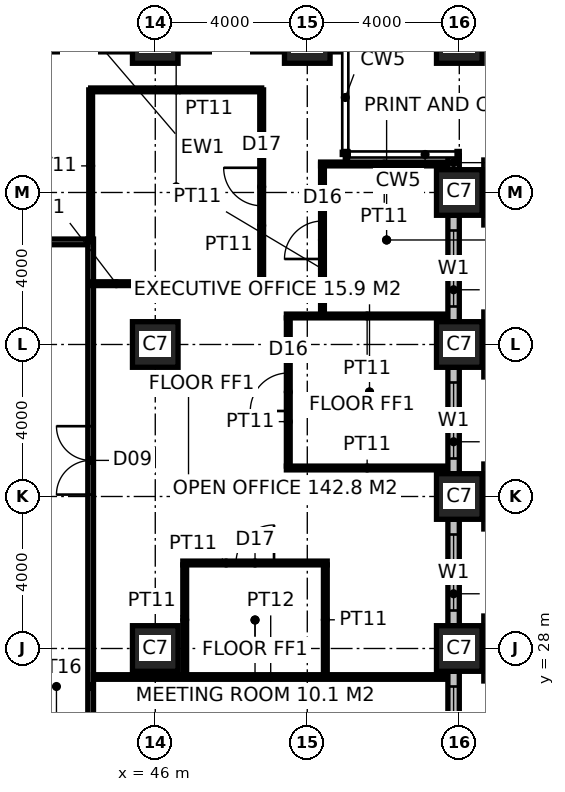
"""IFC4 building model, lengths in metres.
Left out: names, types, materials, properties, quantities, classifications, styles, units other than length and angle.
Written with IfcOpenShell. Run it as: python <this file> out.ifc"""

import sys

from ifc_helpers import new_model, si_unit, direction, frame, frame_2d, origin, origin_2d, place, context, subcontext, project, spatial, rectangle, hollow_rectangle, extrude, element, fill, save


model = new_model("IFC4")
c1 = context("Model", 3, precision=1e-05, world=origin(), true_north=direction((0.0, 1.0)))
c2 = subcontext(c1, "Body", "Model", "MODEL_VIEW")
j1 = project(units=[si_unit("LENGTHUNIT", "METRE"), si_unit("PLANEANGLEUNIT", "RADIAN")], contexts=[c1])
p1 = place(None, origin())
s1 = spatial("IfcSite", under=j1, at=p1, CompositionType="ELEMENT")
p2 = place(p1, origin())
s2 = spatial("IfcBuilding", under=s1, at=p2, CompositionType="ELEMENT")
p3 = place(p2, frame((0.0, 0.0, 15.0)))
s3 = spatial("IfcBuildingStorey", under=s2, at=p3, CompositionType="ELEMENT", Elevation=15.0)
for number, where, z_axis, x_axis in (
    (1, (46.0, 44.0, 0.0), (0.0, 0.0, 1.0), (1.0, 0.0, 0.0)),
    (2, (50.0, 44.0, 0.0), (0.0, 0.0, 1.0), (1.0, 0.0, 0.0)),
    (3, (54.0, 28.0, 0.0), (0.0, 0.0, 1.0), (1.0, 0.0, 0.0)),
    (4, (54.0, 32.0, 0.0), (0.0, 0.0, 1.0), (1.0, 0.0, 0.0)),
    (5, (54.0, 36.0, 0.0), (0.0, 0.0, 1.0), (1.0, 0.0, 0.0)),
    (6, (54.0, 40.0, 0.0), (0.0, 0.0, 1.0), (1.0, 0.0, 0.0)),
    (7, (54.0, 44.0, 0.0), (0.0, 0.0, 1.0), (1.0, 0.0, 0.0)),
    (8, (46.0, 28.0, 0.0), (0.0, 0.0, 1.0), (1.0, 0.0, 0.0)),
    (9, (46.0, 36.0, 0.0), (0.0, 0.0, 1.0), (1.0, 0.0, 0.0)),
):
    element("IfcColumn", number, at=place(p3, frame(where, z_axis=z_axis, x_axis=x_axis)), inside=s3, PredefinedType="COLUMN", context=c2, shape_type="SweptSolid", body=[
        extrude(hollow_rectangle(XDim=1.2, YDim=1.2, WallThickness=0.1, at=origin_2d()), origin(), (0.0, 0.0, 1.0), 4.0),
    ])
p4 = place(p3, frame((44.3, 15.225, 0.0), z_axis=(0.0, 0.0, 1.0), x_axis=(0.0, 1.0, 0.0)))
e10 = element("IfcWall", 10, at=p4, inside=s3, PredefinedType="PARTITIONING", context=c2, shape_type="SweptSolid", body=[
    extrude(rectangle(XDim=23.55, YDim=0.15, at=frame_2d((11.775, 0.0))), origin(), (0.0, 0.0, 1.0), 3.85),
])
p5 = place(p4, frame((5.575, 0.0, 0.0)))
e11 = element("IfcOpeningElement", 11, at=p5, cuts=e10, PredefinedType="OPENING", context=c2, shape_type="SweptSolid", body=[
    extrude(rectangle(XDim=1.8, YDim=2.4, at=frame_2d((0.9, 1.2))), frame((0.0, 0.085, 0.0), z_axis=(0.0, -1.0, 0.0), x_axis=(1.0, 0.0, 0.0)), (0.0, 0.0, 1.0), 0.17),
])
p6 = place(p4, frame((16.825, 0.0, 0.0)))
e12 = element("IfcOpeningElement", 12, at=p6, cuts=e10, PredefinedType="OPENING", context=c2, shape_type="SweptSolid", body=[
    extrude(rectangle(XDim=1.8, YDim=2.4, at=frame_2d((0.9, 1.2))), frame((0.0, 0.085, 0.0), z_axis=(0.0, -1.0, 0.0), x_axis=(1.0, 0.0, 0.0)), (0.0, 0.0, 1.0), 0.17),
])
p7 = place(p3, frame((15.775, 38.7, 0.0), z_axis=(0.0, 0.0, 1.0), x_axis=(1.0, 0.0, 0.0)))
e13 = element("IfcWall", 13, at=p7, inside=s3, PredefinedType="PARTITIONING", context=c2, shape_type="SweptSolid", body=[
    extrude(rectangle(XDim=28.45, YDim=0.15, at=frame_2d((14.225, 0.0))), origin(), (0.0, 0.0, 1.0), 3.85),
])
p8 = place(p7, frame((7.975, 0.0, 0.0)))
e14 = element("IfcOpeningElement", 14, at=p8, cuts=e13, PredefinedType="OPENING", context=c2, shape_type="SweptSolid", body=[
    extrude(rectangle(XDim=0.9, YDim=2.1, at=frame_2d((0.45, 1.05))), frame((0.0, 0.085, 0.0), z_axis=(0.0, -1.0, 0.0), x_axis=(1.0, 0.0, 0.0)), (0.0, 0.0, 1.0), 0.17),
])
p9 = place(p7, frame((11.725, 0.0, 0.0)))
e15 = element("IfcOpeningElement", 15, at=p9, cuts=e13, PredefinedType="OPENING", context=c2, shape_type="SweptSolid", body=[
    extrude(rectangle(XDim=1.0, YDim=2.1, at=frame_2d((0.5, 1.05))), frame((0.0, 0.085, 0.0), z_axis=(0.0, -1.0, 0.0), x_axis=(1.0, 0.0, 0.0)), (0.0, 0.0, 1.0), 0.17),
])
p10 = place(p7, frame((15.575, 0.0, 0.0)))
e16 = element("IfcOpeningElement", 16, at=p10, cuts=e13, PredefinedType="OPENING", context=c2, shape_type="SweptSolid", body=[
    extrude(rectangle(XDim=0.9, YDim=2.1, at=frame_2d((0.45, 1.05))), frame((0.0, 0.085, 0.0), z_axis=(0.0, -1.0, 0.0), x_axis=(1.0, 0.0, 0.0)), (0.0, 0.0, 1.0), 0.17),
])
p11 = place(p3, frame((44.375, 27.25, 0.0), z_axis=(0.0, 0.0, 1.0), x_axis=(1.0, 0.0, 0.0)))
e17 = element("IfcWall", 17, at=p11, inside=s3, PredefinedType="PARTITIONING", context=c2, shape_type="SweptSolid", body=[
    extrude(rectangle(XDim=9.325, YDim=0.12, at=frame_2d((4.663, 0.0))), origin(), (0.0, 0.0, 1.0), 3.85),
])
p12 = place(p3, frame((46.725, 30.25, 0.0), z_axis=(0.0, 0.0, 1.0), x_axis=(1.0, 0.0, 0.0)))
e18 = element("IfcWall", 18, at=p12, inside=s3, PredefinedType="PARTITIONING", context=c2, shape_type="SweptSolid", body=[
    extrude(rectangle(XDim=3.8, YDim=0.1, at=frame_2d((1.9, 0.0))), origin(), (0.0, 0.0, 1.0), 3.85),
])
p13 = place(p12, frame((1.4, 0.0, 0.0)))
e19 = element("IfcOpeningElement", 19, at=p13, cuts=e18, PredefinedType="OPENING", context=c2, shape_type="SweptSolid", body=[
    extrude(rectangle(XDim=1.0, YDim=2.2, at=frame_2d((0.5, 1.1))), frame((0.0, 0.06, 0.0), z_axis=(0.0, -1.0, 0.0), x_axis=(1.0, 0.0, 0.0)), (0.0, 0.0, 1.0), 0.12),
])
for number, where, z_axis, x_axis in (
    (20, (49.45, 32.75, 0.0), (0.0, 0.0, 1.0), (1.0, 0.0, 0.0)),
    (21, (49.45, 36.75, 0.0), (0.0, 0.0, 1.0), (1.0, 0.0, 0.0)),
):
    element("IfcWall", number, at=place(p3, frame(where, z_axis=z_axis, x_axis=x_axis)), inside=s3, PredefinedType="PARTITIONING", context=c2, shape_type="SweptSolid", body=[
        extrude(rectangle(XDim=4.25, YDim=0.1, at=frame_2d((2.125, 0.0))), origin(), (0.0, 0.0, 1.0), 3.85),
    ])
p14 = place(p3, frame((50.35, 40.75, 0.0), z_axis=(0.0, 0.0, 1.0), x_axis=(1.0, 0.0, 0.0)))
e22 = element("IfcWall", 22, at=p14, inside=s3, PredefinedType="PARTITIONING", context=c2, shape_type="SweptSolid", body=[
    extrude(rectangle(XDim=3.35, YDim=0.1, at=frame_2d((1.675, 0.0))), origin(), (0.0, 0.0, 1.0), 3.85),
])
p15 = place(p3, frame((46.775, 27.31, 0.0), z_axis=(0.0, 0.0, 1.0), x_axis=(0.0, 1.0, 0.0)))
e23 = element("IfcWall", 23, at=p15, inside=s3, PredefinedType="PARTITIONING", context=c2, shape_type="SweptSolid", body=[
    extrude(rectangle(XDim=2.89, YDim=0.1, at=frame_2d((1.445, 0.0))), origin(), (0.0, 0.0, 1.0), 3.85),
])
p16 = place(p3, frame((49.5, 32.8, 0.0), z_axis=(0.0, 0.0, 1.0), x_axis=(0.0, 1.0, 0.0)))
e24 = element("IfcWall", 24, at=p16, inside=s3, PredefinedType="PARTITIONING", context=c2, shape_type="SweptSolid", body=[
    extrude(rectangle(XDim=3.9, YDim=0.1, at=frame_2d((1.95, 0.0))), origin(), (0.0, 0.0, 1.0), 3.85),
])
p17 = place(p16, frame((1.45, 0.0, 0.0)))
e25 = element("IfcOpeningElement", 25, at=p17, cuts=e24, PredefinedType="OPENING", context=c2, shape_type="SweptSolid", body=[
    extrude(rectangle(XDim=1.0, YDim=2.2, at=frame_2d((0.5, 1.1))), frame((0.0, 0.06, 0.0), z_axis=(0.0, -1.0, 0.0), x_axis=(1.0, 0.0, 0.0)), (0.0, 0.0, 1.0), 0.12),
])
p18 = place(p3, frame((50.4, 36.8, 0.0), z_axis=(0.0, 0.0, 1.0), x_axis=(0.0, 1.0, 0.0)))
e26 = element("IfcWall", 26, at=p18, inside=s3, PredefinedType="PARTITIONING", context=c2, shape_type="SweptSolid", body=[
    extrude(rectangle(XDim=3.95, YDim=0.1, at=frame_2d((1.975, 0.0))), origin(), (0.0, 0.0, 1.0), 2.95),
])
p19 = place(p18, frame((1.45, 0.0, 0.0)))
e27 = element("IfcOpeningElement", 27, at=p19, cuts=e26, PredefinedType="OPENING", context=c2, shape_type="SweptSolid", body=[
    extrude(rectangle(XDim=1.0, YDim=2.2, at=frame_2d((0.5, 1.1))), frame((0.0, 0.06, 0.0), z_axis=(0.0, -1.0, 0.0), x_axis=(1.0, 0.0, 0.0)), (0.0, 0.0, 1.0), 0.12),
])
p20 = place(p3, frame((50.475, 27.31, 0.0), z_axis=(0.0, 0.0, 1.0), x_axis=(0.0, 1.0, 0.0)))
e28 = element("IfcWall", 28, at=p20, inside=s3, PredefinedType="PARTITIONING", context=c2, shape_type="SweptSolid", body=[
    extrude(rectangle(XDim=2.89, YDim=0.1, at=frame_2d((1.445, 0.0))), origin(), (0.0, 0.0, 1.0), 3.85),
])
p21 = place(p3, frame((44.3, 37.6, 0.0), z_axis=(0.0, 0.0, 1.0), x_axis=(1.0, 0.0, 0.0)))
e29 = element("IfcWall", 29, at=p21, inside=s3, PredefinedType="PARTITIONING", context=c2, shape_type="SweptSolid", body=[
    extrude(rectangle(XDim=4.5, YDim=0.1, at=frame_2d((2.25, 0.0))), origin(), (0.0, 0.0, 1.0), 3.85),
])
p22 = place(p3, frame((48.8, 37.6, 0.0), z_axis=(0.0, 0.0, 1.0), x_axis=(0.0, 1.0, 0.0)))
e30 = element("IfcWall", 30, at=p22, inside=s3, PredefinedType="PARTITIONING", context=c2, shape_type="SweptSolid", body=[
    extrude(rectangle(XDim=5.1, YDim=0.1, at=frame_2d((2.55, 0.0))), origin(), (0.0, 0.0, 1.0), 3.85),
])
p23 = place(p22, frame((2.05, 0.0, 0.0)))
e31 = element("IfcOpeningElement", 31, at=p23, cuts=e30, PredefinedType="OPENING", context=c2, shape_type="SweptSolid", body=[
    extrude(rectangle(XDim=1.0, YDim=2.2, at=frame_2d((0.5, 1.1))), frame((0.0, 0.06, 0.0), z_axis=(0.0, -1.0, 0.0), x_axis=(1.0, 0.0, 0.0)), (0.0, 0.0, 1.0), 0.12),
])
p24 = place(p3, frame((48.8, 42.7, 0.0), z_axis=(0.0, 0.0, 1.0), x_axis=(-1.0, 0.0, 0.0)))
e32 = element("IfcWall", 32, at=p24, inside=s3, PredefinedType="PARTITIONING", context=c2, shape_type="SweptSolid", body=[
    extrude(rectangle(XDim=4.5, YDim=0.1, at=frame_2d((2.25, 0.0))), origin(), (0.0, 0.0, 1.0), 3.85),
])
p25 = place(p3, frame((44.3, 42.7, 0.0), z_axis=(0.0, 0.0, 1.0), x_axis=(0.0, -1.0, 0.0)))
e33 = element("IfcWall", 33, at=p25, inside=s3, PredefinedType="PARTITIONING", context=c2, shape_type="SweptSolid", body=[
    extrude(rectangle(XDim=4.0, YDim=0.1, at=frame_2d((2.0, 0.0))), origin(), (0.0, 0.0, 1.0), 3.85),
])
p26 = place(p3, frame((53.85, 24.6, 0.0), z_axis=(0.0, 0.0, 1.0), x_axis=(0.0, 1.0, 0.0)))
e34 = element("IfcWall", 34, at=p26, inside=s3, PredefinedType="ELEMENTEDWALL", context=c2, shape_type="SweptSolid", body=[
    extrude(rectangle(XDim=2.8, YDim=0.3, at=frame_2d((1.4, 0.0))), origin(), (0.0, 0.0, 1.0), 2.85),
])
p27 = place(p26, frame((0.4, 0.0, 0.8)))
e35 = element("IfcOpeningElement", 35, at=p27, cuts=e34, PredefinedType="OPENING", context=c2, shape_type="SweptSolid", body=[
    extrude(rectangle(XDim=2.0, YDim=2.0, at=frame_2d((1.0, 1.0))), frame((0.0, 0.16, 0.0), z_axis=(0.0, -1.0, 0.0), x_axis=(1.0, 0.0, 0.0)), (0.0, 0.0, 1.0), 0.32),
])
p28 = place(p3, frame((53.85, 28.6, 0.0), z_axis=(0.0, 0.0, 1.0), x_axis=(0.0, 1.0, 0.0)))
e36 = element("IfcWall", 36, at=p28, inside=s3, PredefinedType="ELEMENTEDWALL", context=c2, shape_type="SweptSolid", body=[
    extrude(rectangle(XDim=2.8, YDim=0.3, at=frame_2d((1.4, 0.0))), origin(), (0.0, 0.0, 1.0), 2.85),
])
p29 = place(p28, frame((0.4, 0.0, 0.8)))
e37 = element("IfcOpeningElement", 37, at=p29, cuts=e36, PredefinedType="OPENING", context=c2, shape_type="SweptSolid", body=[
    extrude(rectangle(XDim=2.0, YDim=2.0, at=frame_2d((1.0, 1.0))), frame((0.0, 0.16, 0.0), z_axis=(0.0, -1.0, 0.0), x_axis=(1.0, 0.0, 0.0)), (0.0, 0.0, 1.0), 0.32),
])
p30 = place(p3, frame((53.85, 32.6, 0.0), z_axis=(0.0, 0.0, 1.0), x_axis=(0.0, 1.0, 0.0)))
e38 = element("IfcWall", 38, at=p30, inside=s3, PredefinedType="ELEMENTEDWALL", context=c2, shape_type="SweptSolid", body=[
    extrude(rectangle(XDim=2.8, YDim=0.3, at=frame_2d((1.4, 0.0))), origin(), (0.0, 0.0, 1.0), 2.85),
])
p31 = place(p30, frame((0.4, 0.0, 0.8)))
e39 = element("IfcOpeningElement", 39, at=p31, cuts=e38, PredefinedType="OPENING", context=c2, shape_type="SweptSolid", body=[
    extrude(rectangle(XDim=2.0, YDim=2.0, at=frame_2d((1.0, 1.0))), frame((0.0, 0.16, 0.0), z_axis=(0.0, -1.0, 0.0), x_axis=(1.0, 0.0, 0.0)), (0.0, 0.0, 1.0), 0.32),
])
p32 = place(p3, frame((53.85, 36.6, 0.0), z_axis=(0.0, 0.0, 1.0), x_axis=(0.0, 1.0, 0.0)))
e40 = element("IfcWall", 40, at=p32, inside=s3, PredefinedType="ELEMENTEDWALL", context=c2, shape_type="SweptSolid", body=[
    extrude(rectangle(XDim=2.8, YDim=0.3, at=frame_2d((1.4, 0.0))), origin(), (0.0, 0.0, 1.0), 2.85),
])
p33 = place(p32, frame((0.4, 0.0, 0.8)))
e41 = element("IfcOpeningElement", 41, at=p33, cuts=e40, PredefinedType="OPENING", context=c2, shape_type="SweptSolid", body=[
    extrude(rectangle(XDim=2.0, YDim=2.0, at=frame_2d((1.0, 1.0))), frame((0.0, 0.16, 0.0), z_axis=(0.0, -1.0, 0.0), x_axis=(1.0, 0.0, 0.0)), (0.0, 0.0, 1.0), 0.32),
])
p34 = place(p3, frame((53.85, 40.6, 0.0), z_axis=(0.0, 0.0, 1.0), x_axis=(0.0, 1.0, 0.0)))
e42 = element("IfcWall", 42, at=p34, inside=s3, PredefinedType="ELEMENTEDWALL", context=c2, shape_type="SweptSolid", body=[
    extrude(rectangle(XDim=0.37, YDim=0.3, at=frame_2d((0.185, 0.0))), origin(), (0.0, 0.0, 1.0), 2.95),
])
p35 = place(p6, origin())
e43 = element("IfcDoor", 43, at=p35, inside=s3, OperationType="DOUBLE_DOOR_DOUBLE_SWING", PredefinedType="DOOR", context=c2, shape_type="SweptSolid", body=[
    extrude(rectangle(XDim=1.8, YDim=2.4, at=frame_2d((0.9, 1.2))), frame((0.0, 0.025, 0.0), z_axis=(0.0, -1.0, 0.0), x_axis=(1.0, 0.0, 0.0)), (0.0, 0.0, 1.0), 0.05),
])
fill(e12, e43)
p36 = place(p17, origin())
e44 = element("IfcDoor", 44, at=p36, inside=s3, OperationType="SINGLE_SWING_LEFT", PredefinedType="DOOR", context=c2, shape_type="SweptSolid", body=[
    extrude(rectangle(XDim=1.0, YDim=2.2, at=frame_2d((0.5, 1.1))), frame((0.0, 0.025, 0.0), z_axis=(0.0, -1.0, 0.0), x_axis=(1.0, 0.0, 0.0)), (0.0, 0.0, 1.0), 0.05),
])
fill(e25, e44)
p37 = place(p19, origin())
e45 = element("IfcDoor", 45, at=p37, inside=s3, OperationType="SINGLE_SWING_LEFT", PredefinedType="DOOR", context=c2, shape_type="SweptSolid", body=[
    extrude(rectangle(XDim=1.0, YDim=2.2, at=frame_2d((0.5, 1.1))), frame((0.0, 0.025, 0.0), z_axis=(0.0, -1.0, 0.0), x_axis=(1.0, 0.0, 0.0)), (0.0, 0.0, 1.0), 0.05),
])
fill(e27, e45)
p38 = place(p13, origin())
e46 = element("IfcDoor", 46, at=p38, inside=s3, OperationType="SINGLE_SWING_RIGHT", PredefinedType="DOOR", context=c2, shape_type="SweptSolid", body=[
    extrude(rectangle(XDim=1.0, YDim=2.2, at=frame_2d((0.5, 1.1))), frame((0.0, 0.025, 0.0), z_axis=(0.0, -1.0, 0.0), x_axis=(1.0, 0.0, 0.0)), (0.0, 0.0, 1.0), 0.05),
])
fill(e19, e46)
p39 = place(p23, origin())
e47 = element("IfcDoor", 47, at=p39, inside=s3, OperationType="SINGLE_SWING_RIGHT", PredefinedType="DOOR", context=c2, shape_type="SweptSolid", body=[
    extrude(rectangle(XDim=1.0, YDim=2.2, at=frame_2d((0.5, 1.1))), frame((0.0, 0.025, 0.0), z_axis=(0.0, -1.0, 0.0), x_axis=(1.0, 0.0, 0.0)), (0.0, 0.0, 1.0), 0.05),
])
fill(e31, e47)
p40 = place(p27, origin())
e48 = element("IfcWindow", 48, at=p40, inside=s3, PartitioningType="SINGLE_PANEL", PredefinedType="WINDOW", context=c2, shape_type="SweptSolid", body=[
    extrude(rectangle(XDim=2.0, YDim=2.0, at=frame_2d((1.0, 1.0))), frame((0.0, 0.03, 0.0), z_axis=(0.0, -1.0, 0.0), x_axis=(1.0, 0.0, 0.0)), (0.0, 0.0, 1.0), 0.06),
])
fill(e35, e48)
p41 = place(p29, origin())
e49 = element("IfcWindow", 49, at=p41, inside=s3, PartitioningType="SINGLE_PANEL", PredefinedType="WINDOW", context=c2, shape_type="SweptSolid", body=[
    extrude(rectangle(XDim=2.0, YDim=2.0, at=frame_2d((1.0, 1.0))), frame((0.0, 0.03, 0.0), z_axis=(0.0, -1.0, 0.0), x_axis=(1.0, 0.0, 0.0)), (0.0, 0.0, 1.0), 0.06),
])
fill(e37, e49)
p42 = place(p31, origin())
e50 = element("IfcWindow", 50, at=p42, inside=s3, PartitioningType="SINGLE_PANEL", PredefinedType="WINDOW", context=c2, shape_type="SweptSolid", body=[
    extrude(rectangle(XDim=2.0, YDim=2.0, at=frame_2d((1.0, 1.0))), frame((0.0, 0.03, 0.0), z_axis=(0.0, -1.0, 0.0), x_axis=(1.0, 0.0, 0.0)), (0.0, 0.0, 1.0), 0.06),
])
fill(e39, e50)
p43 = place(p33, origin())
e51 = element("IfcWindow", 51, at=p43, inside=s3, PartitioningType="SINGLE_PANEL", PredefinedType="WINDOW", context=c2, shape_type="SweptSolid", body=[
    extrude(rectangle(XDim=2.0, YDim=2.0, at=frame_2d((1.0, 1.0))), frame((0.0, 0.03, 0.0), z_axis=(0.0, -1.0, 0.0), x_axis=(1.0, 0.0, 0.0)), (0.0, 0.0, 1.0), 0.06),
])
fill(e41, e51)
save(model, sys.argv[1])
